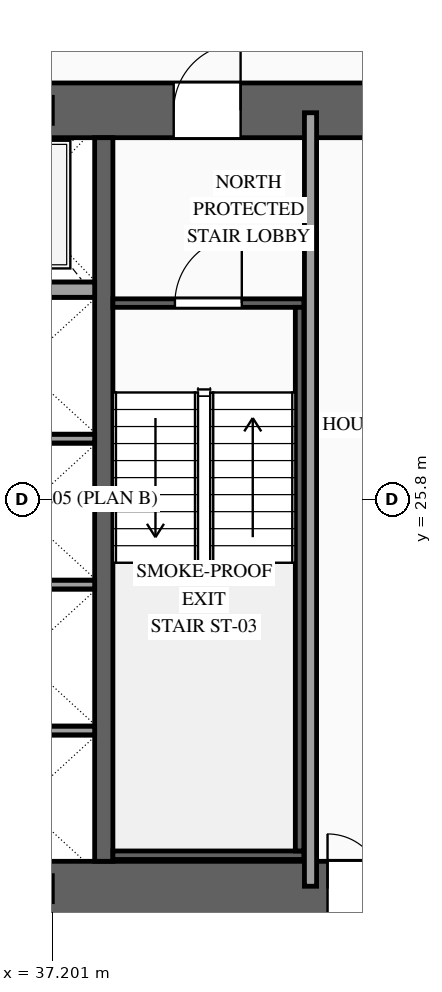
"""IFC4 building model, lengths in metres.
Left out: names, types, materials, properties, quantities, classifications, styles, units other than length and angle.
Written with IfcOpenShell. Run it as: python <this file> out.ifc"""

import sys

from ifc_helpers import new_model, si_unit, direction, frame, frame_2d, origin, origin_2d, place, context, subcontext, project, spatial, rectangle, i_section, extrude, source, transform, mapped, element, fill, save


model = new_model("IFC4")
c1 = context("Model", 3, precision=1e-05, world=origin(), true_north=direction((0.0, 1.0)))
c2 = subcontext(c1, "Body", "Model", "MODEL_VIEW")
j1 = project(units=[si_unit("LENGTHUNIT", "METRE"), si_unit("PLANEANGLEUNIT", "RADIAN")], contexts=[c1])
p1 = place(None, origin())
s1 = spatial("IfcSite", under=j1, at=p1, CompositionType="ELEMENT")
p2 = place(p1, origin())
s2 = spatial("IfcBuilding", under=s1, at=p2, CompositionType="ELEMENT")
p3 = place(p2, frame((0.0, 0.0, 82.0)))
s3 = spatial("IfcBuildingStorey", under=s2, at=p3, CompositionType="ELEMENT", Elevation=82.0)
p4 = place(p3, frame((23.35, 19.4, 0.0), z_axis=(0.0, 0.0, 1.0), x_axis=(1.0, 0.0, 0.0)))
e1 = element("IfcWall", 1, at=p4, inside=s3, PredefinedType="SHEAR", context=c2, shape_type="SweptSolid", body=[
    extrude(rectangle(XDim=27.3, YDim=0.9, at=frame_2d((13.65, 0.0))), origin(), (0.0, 0.0, 1.0), 3.6),
])
p5 = place(p4, frame((2.1, 0.0, 0.0)))
e2 = element("IfcOpeningElement", 2, at=p5, cuts=e1, PredefinedType="OPENING", context=c2, shape_type="SweptSolid", body=[
    extrude(rectangle(XDim=1.1, YDim=2.2, at=frame_2d((0.55, 1.1))), frame((0.0, 0.465, 0.0), z_axis=(0.0, -1.0, 0.0), x_axis=(1.0, 0.0, 0.0)), (0.0, 0.0, 1.0), 0.93),
])
p6 = place(p4, frame((10.0, 0.0, 0.0)))
e3 = element("IfcOpeningElement", 3, at=p6, cuts=e1, PredefinedType="OPENING", context=c2, shape_type="SweptSolid", body=[
    extrude(rectangle(XDim=1.1, YDim=2.2, at=frame_2d((0.55, 1.1))), frame((0.0, 0.465, 0.0), z_axis=(0.0, -1.0, 0.0), x_axis=(1.0, 0.0, 0.0)), (0.0, 0.0, 1.0), 0.93),
])
p7 = place(p4, frame((23.2, 0.0, 0.0)))
e4 = element("IfcOpeningElement", 4, at=p7, cuts=e1, PredefinedType="OPENING", context=c2, shape_type="SweptSolid", body=[
    extrude(rectangle(XDim=1.1, YDim=2.2, at=frame_2d((0.55, 1.1))), frame((0.0, 0.465, 0.0), z_axis=(0.0, -1.0, 0.0), x_axis=(1.0, 0.0, 0.0)), (0.0, 0.0, 1.0), 0.93),
])
p8 = place(p4, frame((19.82, 0.0, 0.0)))
e5 = element("IfcOpeningElement", 5, at=p8, cuts=e1, PredefinedType="OPENING", context=c2, shape_type="SweptSolid", body=[
    extrude(rectangle(XDim=0.9, YDim=2.15, at=frame_2d((0.45, 1.075))), frame((0.0, 0.465, 0.0), z_axis=(0.0, -1.0, 0.0), x_axis=(1.0, 0.0, 0.0)), (0.0, 0.0, 1.0), 0.93),
])
p9 = place(p4, frame((18.38, 0.0, 0.0)))
e6 = element("IfcOpeningElement", 6, at=p9, cuts=e1, PredefinedType="OPENING", context=c2, shape_type="SweptSolid", body=[
    extrude(rectangle(XDim=0.9, YDim=2.15, at=frame_2d((0.45, 1.075))), frame((0.0, 0.465, 0.0), z_axis=(0.0, -1.0, 0.0), x_axis=(1.0, 0.0, 0.0)), (0.0, 0.0, 1.0), 0.93),
])
p10 = place(p3, frame((23.35, 32.2, 0.0), z_axis=(0.0, 0.0, 1.0), x_axis=(1.0, 0.0, 0.0)))
e7 = element("IfcWall", 7, at=p10, inside=s3, PredefinedType="SHEAR", context=c2, shape_type="SweptSolid", body=[
    extrude(rectangle(XDim=27.3, YDim=0.9, at=frame_2d((13.65, 0.0))), origin(), (0.0, 0.0, 1.0), 3.6),
])
p11 = place(p10, frame((4.72, 0.0, 0.0)))
e8 = element("IfcOpeningElement", 8, at=p11, cuts=e7, PredefinedType="OPENING", context=c2, shape_type="SweptSolid", body=[
    extrude(rectangle(XDim=0.9, YDim=2.15, at=frame_2d((0.45, 1.075))), frame((0.0, 0.465, 0.0), z_axis=(0.0, -1.0, 0.0), x_axis=(1.0, 0.0, 0.0)), (0.0, 0.0, 1.0), 0.93),
])
p12 = place(p10, frame((10.0, 0.0, 0.0)))
e9 = element("IfcOpeningElement", 9, at=p12, cuts=e7, PredefinedType="OPENING", context=c2, shape_type="SweptSolid", body=[
    extrude(rectangle(XDim=1.1, YDim=2.2, at=frame_2d((0.55, 1.1))), frame((0.0, 0.465, 0.0), z_axis=(0.0, -1.0, 0.0), x_axis=(1.0, 0.0, 0.0)), (0.0, 0.0, 1.0), 0.93),
])
p13 = place(p10, frame((15.85, 0.0, 0.0)))
e10 = element("IfcOpeningElement", 10, at=p13, cuts=e7, PredefinedType="OPENING", context=c2, shape_type="SweptSolid", body=[
    extrude(rectangle(XDim=1.1, YDim=2.2, at=frame_2d((0.55, 1.1))), frame((0.0, 0.465, 0.0), z_axis=(0.0, -1.0, 0.0), x_axis=(1.0, 0.0, 0.0)), (0.0, 0.0, 1.0), 0.93),
])
m1 = source(origin(), c2, "Body", "SweptSolid", [
    extrude(rectangle(XDim=11.9, YDim=0.3, at=frame_2d((5.95, 0.0))), origin(), (0.0, 0.0, 1.0), 3.6),
])
p14 = place(p3, frame((38.05, 19.85, 0.0), z_axis=(0.0, 0.0, 1.0), x_axis=(0.0, 1.0, 0.0)))
e11 = element("IfcWall", 11, at=p14, inside=s3, PredefinedType="SOLIDWALL", context=c2, shape_type="MappedRepresentation", body=[
    mapped(m1, transform((0.0, 0.0, 0.0), scale=1.0)),
])
m2 = source(origin(), c2, "Body", "SweptSolid", [
    extrude(i_section(OverallWidth=0.407, OverallDepth=0.428, WebThickness=0.02, FlangeThickness=0.035, at=origin_2d()), origin(), (0.0, 0.0, 1.0), 3.6),
])
for number, where, z_axis, x_axis in (
    (12, (37.0, 19.4, 0.0), (0.0, 0.0, 1.0), (1.0, 0.0, 0.0)),
    (13, (37.0, 32.2, 0.0), (0.0, 0.0, 1.0), (1.0, 0.0, 0.0)),
):
    element("IfcColumn", number, at=place(p3, frame(where, z_axis=z_axis, x_axis=x_axis)), inside=s3, PredefinedType="COLUMN", context=c2, shape_type="MappedRepresentation", body=[
        mapped(m2, transform((0.0, 0.0, 0.0), scale=1.0)),
    ])
m3 = source(origin(), c2, "Body", "SweptSolid", [
    extrude(rectangle(XDim=2.4, YDim=0.14, at=frame_2d((1.2, 0.0))), origin(), (0.0, 0.0, 1.0), 3.32),
])
for number, where, z_axis, x_axis in (
    (14, (35.5, 22.0, 0.0), (0.0, 0.0, 1.0), (1.0, 0.0, 0.0)),
    (15, (35.5, 24.4, 0.0), (0.0, 0.0, 1.0), (1.0, 0.0, 0.0)),
    (16, (35.5, 26.8, 0.0), (0.0, 0.0, 1.0), (1.0, 0.0, 0.0)),
):
    element("IfcWall", number, at=place(p3, frame(where, z_axis=z_axis, x_axis=x_axis)), inside=s3, PredefinedType="SOLIDWALL", context=c2, shape_type="MappedRepresentation", body=[
        mapped(m3, transform((0.0, 0.0, 0.0), scale=1.0)),
    ])
m4 = source(origin(), c2, "Body", "SweptSolid", [
    extrude(rectangle(XDim=2.4, YDim=0.25, at=frame_2d((1.2, 0.0))), origin(), (0.0, 0.0, 1.0), 3.32),
])
p15 = place(p3, frame((35.5, 29.25, 0.0), z_axis=(0.0, 0.0, 1.0), x_axis=(1.0, 0.0, 0.0)))
e17 = element("IfcWall", 17, at=p15, inside=s3, PredefinedType="SOLIDWALL", context=c2, shape_type="MappedRepresentation", body=[
    mapped(m4, transform((0.0, 0.0, 0.0), scale=1.0)),
])
p16 = place(p3, frame((38.2, 29.03, 0.0), z_axis=(0.0, 0.0, 1.0), x_axis=(1.0, 0.0, 0.0)))
e18 = element("IfcWall", 18, at=p16, inside=s3, PredefinedType="SOLIDWALL", context=c2, shape_type="SweptSolid", body=[
    extrude(rectangle(XDim=3.14, YDim=0.14, at=frame_2d((1.57, 0.0))), origin(), (0.0, 0.0, 1.0), 3.32),
])
p17 = place(p16, frame((1.02, 0.0, 0.0)))
e19 = element("IfcOpeningElement", 19, at=p17, cuts=e18, PredefinedType="OPENING", context=c2, shape_type="SweptSolid", body=[
    extrude(rectangle(XDim=1.1, YDim=2.2, at=frame_2d((0.55, 1.1))), frame((0.0, 0.085, 0.0), z_axis=(0.0, -1.0, 0.0), x_axis=(1.0, 0.0, 0.0)), (0.0, 0.0, 1.0), 0.17),
])
m5 = source(origin(), c2, "Body", "SweptSolid", [
    extrude(rectangle(XDim=3.14, YDim=0.14, at=frame_2d((1.57, 0.0))), origin(), (0.0, 0.0, 1.0), 3.32),
])
p18 = place(p3, frame((38.2, 19.95, 0.0), z_axis=(0.0, 0.0, 1.0), x_axis=(1.0, 0.0, 0.0)))
e20 = element("IfcWall", 20, at=p18, inside=s3, PredefinedType="SOLIDWALL", context=c2, shape_type="MappedRepresentation", body=[
    mapped(m5, transform((0.0, 0.0, 0.0), scale=1.0)),
])
m6 = source(origin(), c2, "Body", "SweptSolid", [
    extrude(rectangle(XDim=8.94, YDim=0.14, at=frame_2d((4.47, 0.0))), origin(), (0.0, 0.0, 1.0), 3.32),
])
p19 = place(p3, frame((41.27, 20.02, 0.0), z_axis=(0.0, 0.0, 1.0), x_axis=(0.0, 1.0, 0.0)))
e21 = element("IfcWall", 21, at=p19, inside=s3, PredefinedType="SOLIDWALL", context=c2, shape_type="MappedRepresentation", body=[
    mapped(m6, transform((0.0, 0.0, 0.0), scale=1.0)),
])
m7 = source(origin(), c2, "Body", "SweptSolid", [
    extrude(rectangle(XDim=12.72, YDim=0.2, at=frame_2d((6.36, 0.0))), origin(), (0.0, 0.0, 1.0), 3.32),
])
p20 = place(p3, frame((41.45, 19.44, 0.0), z_axis=(0.0, 0.0, 1.0), x_axis=(0.0, 1.0, 0.0)))
e22 = element("IfcWall", 22, at=p20, inside=s3, PredefinedType="PARTITIONING", context=c2, shape_type="MappedRepresentation", body=[
    mapped(m7, transform((0.0, 0.0, 0.0), scale=1.0)),
])
m8 = source(origin(), c2, "Body", "SweptSolid", [
    extrude(rectangle(XDim=1.1, YDim=2.2, at=frame_2d((0.55, 1.1))), frame((0.0, 0.025, 0.0), z_axis=(0.0, -1.0, 0.0), x_axis=(1.0, 0.0, 0.0)), (0.0, 0.0, 1.0), 0.05),
])
p21 = place(p17, origin())
e23 = element("IfcDoor", 23, at=p21, inside=s3, OperationType="SINGLE_SWING_RIGHT", PredefinedType="DOOR", context=c2, shape_type="MappedRepresentation", body=[
    mapped(m8, transform((0.0, 0.0, 0.0), scale=1.0)),
])
fill(e19, e23)
p22 = place(p13, origin())
e24 = element("IfcDoor", 24, at=p22, inside=s3, OperationType="SINGLE_SWING_RIGHT", PredefinedType="DOOR", context=c2, shape_type="MappedRepresentation", body=[
    mapped(m8, transform((0.0, 0.0, 0.0), scale=1.0)),
])
fill(e10, e24)
m9 = source(origin(), c2, "Body", "SweptSolid", [
    extrude(rectangle(XDim=0.9, YDim=2.15, at=frame_2d((0.45, 1.075))), frame((0.0, 0.025, 0.0), z_axis=(0.0, -1.0, 0.0), x_axis=(1.0, 0.0, 0.0)), (0.0, 0.0, 1.0), 0.05),
])
p23 = place(p9, origin())
e25 = element("IfcDoor", 25, at=p23, inside=s3, OperationType="SINGLE_SWING_LEFT", PredefinedType="DOOR", context=c2, shape_type="MappedRepresentation", body=[
    mapped(m9, transform((0.0, 0.0, 0.0), scale=1.0)),
])
fill(e6, e25)
save(model, sys.argv[1])
